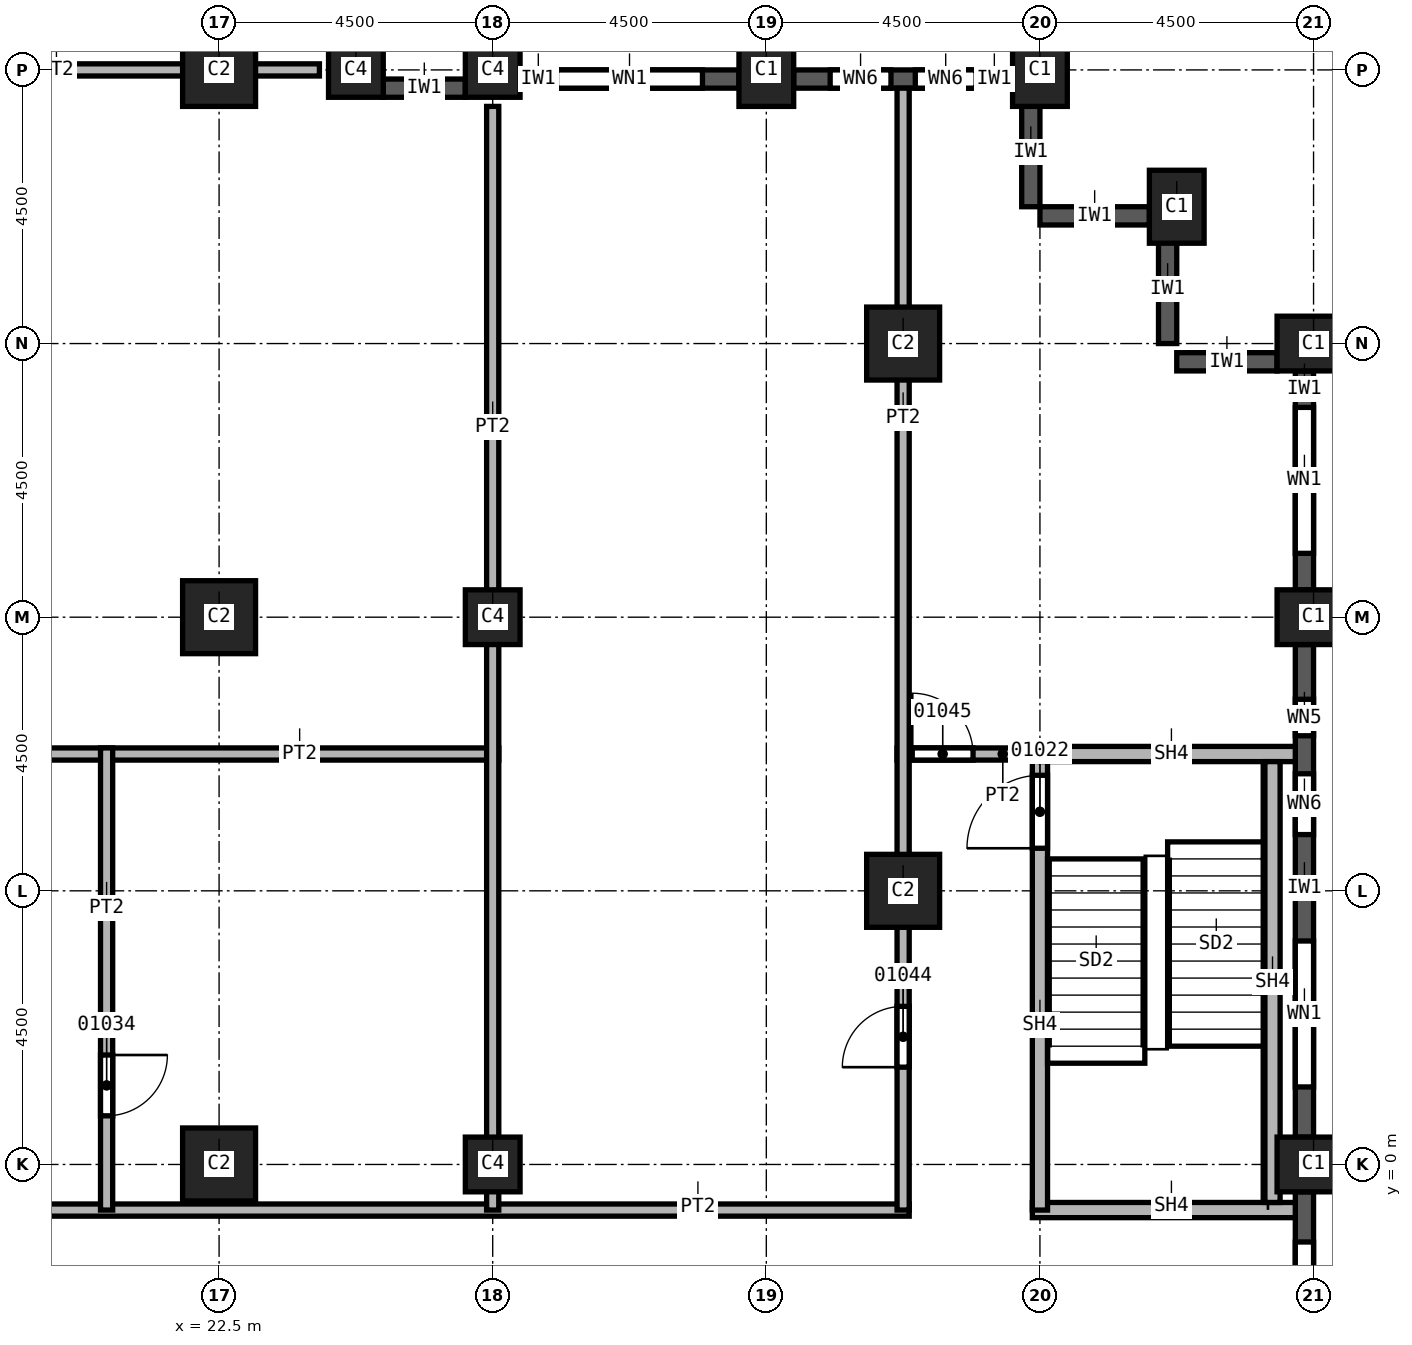
"""IFC4 building model, lengths in metres.
Left out: names, types, materials, properties, quantities, classifications, styles, units other than length and angle.
Written with IfcOpenShell. Run it as: python <this file> out.ifc"""

import sys

from ifc_helpers import new_model, si_unit, direction, frame, frame_2d, origin, origin_2d, place, context, subcontext, project, spatial, rectangle, extrude, element, fill, save


model = new_model("IFC4")
c1 = context("Model", 3, precision=1e-05, world=origin(), true_north=direction((0.0, 1.0)))
c2 = subcontext(c1, "Body", "Model", "MODEL_VIEW")
j1 = project(units=[si_unit("LENGTHUNIT", "METRE"), si_unit("PLANEANGLEUNIT", "RADIAN")], contexts=[c1])
p1 = place(None, origin())
s1 = spatial("IfcSite", under=j1, at=p1, CompositionType="ELEMENT")
p2 = place(p1, origin())
s2 = spatial("IfcBuilding", under=s1, at=p2, CompositionType="ELEMENT")
p3 = place(p2, frame((0.0, 0.0, 68.0)))
s3 = spatial("IfcBuildingStorey", under=s2, at=p3, CompositionType="ELEMENT", Elevation=68.0)
for number, where, z_axis, x_axis in (
    (1, (40.5, 0.0, 0.0), (0.0, 0.0, 1.0), (0.0, 1.0, 0.0)),
    (2, (40.5, 9.0, 0.0), (0.0, 0.0, 1.0), (0.0, 1.0, 0.0)),
    (3, (40.5, 13.5, 0.0), (0.0, 0.0, 1.0), (0.0, 1.0, 0.0)),
    (4, (38.25, 15.75, 0.0), (0.0, 0.0, 1.0), (1.0, 0.0, 0.0)),
    (5, (31.5, 18.0, 0.0), (0.0, 0.0, 1.0), (1.0, 0.0, 0.0)),
    (6, (36.0, 18.0, 0.0), (0.0, 0.0, 1.0), (1.0, 0.0, 0.0)),
):
    element("IfcColumn", number, at=place(p3, frame(where, z_axis=z_axis, x_axis=x_axis)), inside=s3, PredefinedType="COLUMN", context=c2, shape_type="SweptSolid", body=[
        extrude(rectangle(XDim=0.9, YDim=1.2, at=origin_2d()), origin(), (0.0, 0.0, 1.0), 3.7),
    ])
for number, where, z_axis, x_axis in (
    (7, (33.75, 4.5, 0.0), (0.0, 0.0, 1.0), (1.0, 0.0, 0.0)),
    (8, (33.75, 13.5, 0.0), (0.0, 0.0, 1.0), (1.0, 0.0, 0.0)),
    (9, (22.5, 0.0, 0.0), (0.0, 0.0, 1.0), (1.0, 0.0, 0.0)),
    (10, (22.5, 9.0, 0.0), (0.0, 0.0, 1.0), (1.0, 0.0, 0.0)),
    (11, (22.5, 18.0, 0.0), (0.0, 0.0, 1.0), (1.0, 0.0, 0.0)),
):
    element("IfcColumn", number, at=place(p3, frame(where, z_axis=z_axis, x_axis=x_axis)), inside=s3, PredefinedType="COLUMN", context=c2, shape_type="SweptSolid", body=[
        extrude(rectangle(XDim=1.2, YDim=1.2, at=origin_2d()), origin(), (0.0, 0.0, 1.0), 3.7),
    ])
for number, where, z_axis, x_axis in (
    (12, (27.0, 0.0, 0.0), (0.0, 0.0, 1.0), (1.0, 0.0, 0.0)),
    (13, (27.0, 9.0, 0.0), (0.0, 0.0, 1.0), (1.0, 0.0, 0.0)),
    (14, (27.0, 18.0, 0.0), (0.0, 0.0, 1.0), (1.0, 0.0, 0.0)),
    (15, (24.75, 18.0, 0.0), (0.0, 0.0, 1.0), (1.0, 0.0, 0.0)),
):
    element("IfcColumn", number, at=place(p3, frame(where, z_axis=z_axis, x_axis=x_axis)), inside=s3, PredefinedType="COLUMN", context=c2, shape_type="SweptSolid", body=[
        extrude(rectangle(XDim=0.9, YDim=0.9, at=origin_2d()), origin(), (0.0, 0.0, 1.0), 3.7),
    ])
p4 = place(p3, frame((39.9, 13.2, 0.0), z_axis=(0.0, 0.0, 1.0), x_axis=(-1.0, 0.0, 0.0)))
e16 = element("IfcWall", 16, at=p4, inside=s3, PredefinedType="SOLIDWALL", context=c2, shape_type="SweptSolid", body=[
    extrude(rectangle(XDim=1.65, YDim=0.3, at=frame_2d((0.825, 0.0))), origin(), (0.0, 0.0, 1.0), 3.1),
])
for number, where, z_axis, x_axis in (
    (17, (38.1, 15.3, 0.0), (0.0, 0.0, 1.0), (0.0, -1.0, 0.0)),
    (18, (37.8, 15.6, 0.0), (0.0, 0.0, 1.0), (-1.0, 0.0, 0.0)),
    (19, (35.85, 17.55, 0.0), (0.0, 0.0, 1.0), (0.0, -1.0, 0.0)),
):
    element("IfcWall", number, at=place(p3, frame(where, z_axis=z_axis, x_axis=x_axis)), inside=s3, PredefinedType="SOLIDWALL", context=c2, shape_type="SweptSolid", body=[
        extrude(rectangle(XDim=1.8, YDim=0.3, at=frame_2d((0.9, 0.0))), origin(), (0.0, 0.0, 1.0), 3.1),
    ])
p5 = place(p3, frame((40.35, -8.55, 0.0), z_axis=(0.0, 0.0, 1.0), x_axis=(0.0, 1.0, 0.0)))
e20 = element("IfcWall", 20, at=p5, inside=s3, PredefinedType="SOLIDWALL", context=c2, shape_type="SweptSolid", body=[
    extrude(rectangle(XDim=8.1, YDim=0.3, at=frame_2d((4.05, 0.0))), origin(), (0.0, 0.0, 1.0), 3.1),
])
p6 = place(p5, frame((0.825, 0.0, 0.8)))
e21 = element("IfcOpeningElement", 21, at=p6, cuts=e20, PredefinedType="OPENING", context=c2, shape_type="SweptSolid", body=[
    extrude(rectangle(XDim=2.4, YDim=1.95, at=frame_2d((1.2, 0.975))), frame((0.0, 0.15, 0.0), z_axis=(0.0, -1.0, 0.0), x_axis=(1.0, 0.0, 0.0)), (0.0, 0.0, 1.0), 0.3),
])
p7 = place(p5, frame((4.875, 0.0, 0.8)))
e22 = element("IfcOpeningElement", 22, at=p7, cuts=e20, PredefinedType="OPENING", context=c2, shape_type="SweptSolid", body=[
    extrude(rectangle(XDim=2.4, YDim=1.95, at=frame_2d((1.2, 0.975))), frame((0.0, 0.15, 0.0), z_axis=(0.0, -1.0, 0.0), x_axis=(1.0, 0.0, 0.0)), (0.0, 0.0, 1.0), 0.3),
])
p8 = place(p3, frame((40.35, 0.45, 0.0), z_axis=(0.0, 0.0, 1.0), x_axis=(0.0, 1.0, 0.0)))
e23 = element("IfcWall", 23, at=p8, inside=s3, PredefinedType="SOLIDWALL", context=c2, shape_type="SweptSolid", body=[
    extrude(rectangle(XDim=8.1, YDim=0.3, at=frame_2d((4.05, 0.0))), origin(), (0.0, 0.0, 1.0), 3.1),
])
p9 = place(p8, frame((0.825, 0.0, 0.8)))
e24 = element("IfcOpeningElement", 24, at=p9, cuts=e23, PredefinedType="OPENING", context=c2, shape_type="SweptSolid", body=[
    extrude(rectangle(XDim=2.4, YDim=1.95, at=frame_2d((1.2, 0.975))), frame((0.0, 0.15, 0.0), z_axis=(0.0, -1.0, 0.0), x_axis=(1.0, 0.0, 0.0)), (0.0, 0.0, 1.0), 0.3),
])
p10 = place(p8, frame((4.975, 0.0, 0.8)))
e25 = element("IfcOpeningElement", 25, at=p10, cuts=e23, PredefinedType="OPENING", context=c2, shape_type="SweptSolid", body=[
    extrude(rectangle(XDim=1.0, YDim=1.95, at=frame_2d((0.5, 0.975))), frame((0.0, 0.15, 0.0), z_axis=(0.0, -1.0, 0.0), x_axis=(1.0, 0.0, 0.0)), (0.0, 0.0, 1.0), 0.3),
])
p11 = place(p8, frame((6.6, 0.0, 0.8)))
e26 = element("IfcOpeningElement", 26, at=p11, cuts=e23, PredefinedType="OPENING", context=c2, shape_type="SweptSolid", body=[
    extrude(rectangle(XDim=0.6, YDim=1.95, at=frame_2d((0.3, 0.975))), frame((0.0, 0.15, 0.0), z_axis=(0.0, -1.0, 0.0), x_axis=(1.0, 0.0, 0.0)), (0.0, 0.0, 1.0), 0.3),
])
p12 = place(p3, frame((40.35, 9.45, 0.0), z_axis=(0.0, 0.0, 1.0), x_axis=(0.0, 1.0, 0.0)))
e27 = element("IfcWall", 27, at=p12, inside=s3, PredefinedType="SOLIDWALL", context=c2, shape_type="SweptSolid", body=[
    extrude(rectangle(XDim=3.6, YDim=0.3, at=frame_2d((1.8, 0.0))), origin(), (0.0, 0.0, 1.0), 3.1),
])
p13 = place(p12, frame((0.6, 0.0, 0.8)))
e28 = element("IfcOpeningElement", 28, at=p13, cuts=e27, PredefinedType="OPENING", context=c2, shape_type="SweptSolid", body=[
    extrude(rectangle(XDim=2.4, YDim=1.95, at=frame_2d((1.2, 0.975))), frame((0.0, 0.15, 0.0), z_axis=(0.0, -1.0, 0.0), x_axis=(1.0, 0.0, 0.0)), (0.0, 0.0, 1.0), 0.3),
])
p14 = place(p3, frame((35.55, 17.85, 0.0), z_axis=(0.0, 0.0, 1.0), x_axis=(-1.0, 0.0, 0.0)))
e29 = element("IfcWall", 29, at=p14, inside=s3, PredefinedType="SOLIDWALL", context=c2, shape_type="SweptSolid", body=[
    extrude(rectangle(XDim=3.6, YDim=0.3, at=frame_2d((1.8, 0.0))), origin(), (0.0, 0.0, 1.0), 3.1),
])
p15 = place(p14, frame((0.6, 0.0, 0.8)))
e30 = element("IfcOpeningElement", 30, at=p15, cuts=e29, PredefinedType="OPENING", context=c2, shape_type="SweptSolid", body=[
    extrude(rectangle(XDim=1.0, YDim=1.95, at=frame_2d((0.5, 0.975))), frame((0.0, 0.15, 0.0), z_axis=(0.0, -1.0, 0.0), x_axis=(1.0, 0.0, 0.0)), (0.0, 0.0, 1.0), 0.3),
])
p16 = place(p14, frame((2.0, 0.0, 0.8)))
e31 = element("IfcOpeningElement", 31, at=p16, cuts=e29, PredefinedType="OPENING", context=c2, shape_type="SweptSolid", body=[
    extrude(rectangle(XDim=1.0, YDim=1.95, at=frame_2d((0.5, 0.975))), frame((0.0, 0.15, 0.0), z_axis=(0.0, -1.0, 0.0), x_axis=(1.0, 0.0, 0.0)), (0.0, 0.0, 1.0), 0.3),
])
p17 = place(p3, frame((31.05, 17.85, 0.0), z_axis=(0.0, 0.0, 1.0), x_axis=(-1.0, 0.0, 0.0)))
e32 = element("IfcWall", 32, at=p17, inside=s3, PredefinedType="SOLIDWALL", context=c2, shape_type="SweptSolid", body=[
    extrude(rectangle(XDim=3.6, YDim=0.3, at=frame_2d((1.8, 0.0))), origin(), (0.0, 0.0, 1.0), 3.1),
])
p18 = place(p17, frame((0.6, 0.0, 0.8)))
e33 = element("IfcOpeningElement", 33, at=p18, cuts=e32, PredefinedType="OPENING", context=c2, shape_type="SweptSolid", body=[
    extrude(rectangle(XDim=2.4, YDim=1.95, at=frame_2d((1.2, 0.975))), frame((0.0, 0.15, 0.0), z_axis=(0.0, -1.0, 0.0), x_axis=(1.0, 0.0, 0.0)), (0.0, 0.0, 1.0), 0.3),
])
p19 = place(p3, frame((26.55, 17.7, 0.0), z_axis=(0.0, 0.0, 1.0), x_axis=(-1.0, 0.0, 0.0)))
e34 = element("IfcWall", 34, at=p19, inside=s3, PredefinedType="SOLIDWALL", context=c2, shape_type="SweptSolid", body=[
    extrude(rectangle(XDim=1.35, YDim=0.3, at=frame_2d((0.675, 0.0))), origin(), (0.0, 0.0, 1.0), 3.1),
])
p20 = place(p3, frame((15.4, -0.75, 0.0), z_axis=(0.0, 0.0, 1.0), x_axis=(1.0, 0.0, 0.0)))
e35 = element("IfcWall", 35, at=p20, inside=s3, PredefinedType="PARTITIONING", context=c2, shape_type="SweptSolid", body=[
    extrude(rectangle(XDim=18.45, YDim=0.2, at=frame_2d((9.225, 0.0))), origin(), (0.0, 0.0, 1.0), 3.7),
])
p21 = place(p3, frame((15.4, 6.75, 0.0), z_axis=(0.0, 0.0, 1.0), x_axis=(1.0, 0.0, 0.0)))
e36 = element("IfcWall", 36, at=p21, inside=s3, PredefinedType="PARTITIONING", context=c2, shape_type="SweptSolid", body=[
    extrude(rectangle(XDim=11.7, YDim=0.2, at=frame_2d((5.85, 0.0))), origin(), (0.0, 0.0, 1.0), 3.7),
])
p22 = place(p3, frame((15.4, 18.0, 0.0), z_axis=(0.0, 0.0, 1.0), x_axis=(1.0, 0.0, 0.0)))
e37 = element("IfcWall", 37, at=p22, inside=s3, PredefinedType="PARTITIONING", context=c2, shape_type="SweptSolid", body=[
    extrude(rectangle(XDim=8.75, YDim=0.2, at=frame_2d((4.375, 0.0))), origin(), (0.0, 0.0, 1.0), 3.7),
])
p23 = place(p3, frame((20.65, 6.85, 0.0), z_axis=(0.0, 0.0, 1.0), x_axis=(0.0, -1.0, 0.0)))
e38 = element("IfcWall", 38, at=p23, inside=s3, PredefinedType="PARTITIONING", context=c2, shape_type="SweptSolid", body=[
    extrude(rectangle(XDim=7.6, YDim=0.2, at=frame_2d((3.8, 0.0))), origin(), (0.0, 0.0, 1.0), 3.7),
])
p24 = place(p23, frame((5.05, 0.0, 0.0)))
e39 = element("IfcOpeningElement", 39, at=p24, cuts=e38, PredefinedType="OPENING", context=c2, shape_type="SweptSolid", body=[
    extrude(rectangle(XDim=1.0, YDim=2.1, at=frame_2d((0.5, 1.05))), frame((0.0, 0.1, 0.0), z_axis=(0.0, -1.0, 0.0), x_axis=(1.0, 0.0, 0.0)), (0.0, 0.0, 1.0), 0.2),
])
p25 = place(p3, frame((27.0, 17.4, 0.0), z_axis=(0.0, 0.0, 1.0), x_axis=(0.0, -1.0, 0.0)))
e40 = element("IfcWall", 40, at=p25, inside=s3, PredefinedType="PARTITIONING", context=c2, shape_type="SweptSolid", body=[
    extrude(rectangle(XDim=18.15, YDim=0.2, at=frame_2d((9.075, 0.0))), origin(), (0.0, 0.0, 1.0), 3.7),
])
p26 = place(p3, frame((33.65, 6.75, 0.0), z_axis=(0.0, 0.0, 1.0), x_axis=(1.0, 0.0, 0.0)))
e41 = element("IfcWall", 41, at=p26, inside=s3, PredefinedType="PARTITIONING", context=c2, shape_type="SweptSolid", body=[
    extrude(rectangle(XDim=2.35, YDim=0.2, at=frame_2d((1.175, 0.0))), origin(), (0.0, 0.0, 1.0), 3.7),
])
p27 = place(p26, frame((0.25, 0.0, 0.0)))
e42 = element("IfcOpeningElement", 42, at=p27, cuts=e41, PredefinedType="OPENING", context=c2, shape_type="SweptSolid", body=[
    extrude(rectangle(XDim=1.0, YDim=2.1, at=frame_2d((0.5, 1.05))), frame((0.0, 0.1, 0.0), z_axis=(0.0, -1.0, 0.0), x_axis=(1.0, 0.0, 0.0)), (0.0, 0.0, 1.0), 0.2),
])
p28 = place(p3, frame((33.75, -0.75, 0.0), z_axis=(0.0, 0.0, 1.0), x_axis=(0.0, 1.0, 0.0)))
e43 = element("IfcWall", 43, at=p28, inside=s3, PredefinedType="PARTITIONING", context=c2, shape_type="SweptSolid", body=[
    extrude(rectangle(XDim=18.45, YDim=0.2, at=frame_2d((9.225, 0.0))), origin(), (0.0, 0.0, 1.0), 3.7),
])
p29 = place(p28, frame((2.35, 0.0, 0.0)))
e44 = element("IfcOpeningElement", 44, at=p29, cuts=e43, PredefinedType="OPENING", context=c2, shape_type="SweptSolid", body=[
    extrude(rectangle(XDim=1.0, YDim=2.1, at=frame_2d((0.5, 1.05))), frame((0.0, 0.1, 0.0), z_axis=(0.0, -1.0, 0.0), x_axis=(1.0, 0.0, 0.0)), (0.0, 0.0, 1.0), 0.2),
])
p30 = place(p3, frame((35.875, -0.75, 0.0), z_axis=(0.0, 0.0, 1.0), x_axis=(1.0, 0.0, 0.0)))
e45 = element("IfcWall", 45, at=p30, inside=s3, PredefinedType="SOLIDWALL", context=c2, shape_type="SweptSolid", body=[
    extrude(rectangle(XDim=4.325, YDim=0.25, at=frame_2d((2.163, 0.0))), origin(), (0.0, 0.0, 1.0), 3.7),
])
p31 = place(p3, frame((36.0, -0.75, 0.0), z_axis=(0.0, 0.0, 1.0), x_axis=(0.0, 1.0, 0.0)))
e46 = element("IfcWall", 46, at=p31, inside=s3, PredefinedType="SOLIDWALL", context=c2, shape_type="SweptSolid", body=[
    extrude(rectangle(XDim=7.625, YDim=0.25, at=frame_2d((3.812, 0.0))), origin(), (0.0, 0.0, 1.0), 3.7),
])
p32 = place(p31, frame((5.95, 0.0, 0.0)))
e47 = element("IfcOpeningElement", 47, at=p32, cuts=e46, PredefinedType="OPENING", context=c2, shape_type="SweptSolid", body=[
    extrude(rectangle(XDim=1.2, YDim=2.1, at=frame_2d((0.6, 1.05))), frame((0.0, 0.125, 0.0), z_axis=(0.0, -1.0, 0.0), x_axis=(1.0, 0.0, 0.0)), (0.0, 0.0, 1.0), 0.25),
])
p33 = place(p3, frame((36.0, 6.75, 0.0), z_axis=(0.0, 0.0, 1.0), x_axis=(1.0, 0.0, 0.0)))
e48 = element("IfcWall", 48, at=p33, inside=s3, PredefinedType="SOLIDWALL", context=c2, shape_type="SweptSolid", body=[
    extrude(rectangle(XDim=4.2, YDim=0.25, at=frame_2d((2.1, 0.0))), origin(), (0.0, 0.0, 1.0), 3.7),
])
p34 = place(p3, frame((39.825, -0.625, 0.0), z_axis=(0.0, 0.0, 1.0), x_axis=(0.0, 1.0, 0.0)))
e49 = element("IfcWall", 49, at=p34, inside=s3, PredefinedType="SOLIDWALL", context=c2, shape_type="SweptSolid", body=[
    extrude(rectangle(XDim=7.25, YDim=0.25, at=frame_2d((3.625, 0.0))), origin(), (0.0, 0.0, 1.0), 3.7),
])
p35 = place(p7, origin())
e50 = element("IfcWindow", 50, at=p35, inside=s3, PartitioningType="SINGLE_PANEL", PredefinedType="WINDOW", context=c2, shape_type="SweptSolid", body=[
    extrude(rectangle(XDim=2.4, YDim=1.95, at=frame_2d((1.2, 0.975))), frame((0.0, 0.03, 0.0), z_axis=(0.0, -1.0, 0.0), x_axis=(1.0, 0.0, 0.0)), (0.0, 0.0, 1.0), 0.06),
])
fill(e22, e50)
p36 = place(p9, origin())
e51 = element("IfcWindow", 51, at=p36, inside=s3, PartitioningType="SINGLE_PANEL", PredefinedType="WINDOW", context=c2, shape_type="SweptSolid", body=[
    extrude(rectangle(XDim=2.4, YDim=1.95, at=frame_2d((1.2, 0.975))), frame((0.0, 0.03, 0.0), z_axis=(0.0, -1.0, 0.0), x_axis=(1.0, 0.0, 0.0)), (0.0, 0.0, 1.0), 0.06),
])
fill(e24, e51)
p37 = place(p13, origin())
e52 = element("IfcWindow", 52, at=p37, inside=s3, PartitioningType="SINGLE_PANEL", PredefinedType="WINDOW", context=c2, shape_type="SweptSolid", body=[
    extrude(rectangle(XDim=2.4, YDim=1.95, at=frame_2d((1.2, 0.975))), frame((0.0, 0.03, 0.0), z_axis=(0.0, -1.0, 0.0), x_axis=(1.0, 0.0, 0.0)), (0.0, 0.0, 1.0), 0.06),
])
fill(e28, e52)
p38 = place(p18, origin())
e53 = element("IfcWindow", 53, at=p38, inside=s3, PartitioningType="SINGLE_PANEL", PredefinedType="WINDOW", context=c2, shape_type="SweptSolid", body=[
    extrude(rectangle(XDim=2.4, YDim=1.95, at=frame_2d((1.2, 0.975))), frame((0.0, 0.03, 0.0), z_axis=(0.0, -1.0, 0.0), x_axis=(1.0, 0.0, 0.0)), (0.0, 0.0, 1.0), 0.06),
])
fill(e33, e53)
p39 = place(p32, origin())
e54 = element("IfcDoor", 54, at=p39, inside=s3, OperationType="SINGLE_SWING_LEFT", PredefinedType="DOOR", context=c2, shape_type="SweptSolid", body=[
    extrude(rectangle(XDim=1.2, YDim=2.1, at=frame_2d((0.6, 1.05))), frame((0.0, 0.025, 0.0), z_axis=(0.0, -1.0, 0.0), x_axis=(1.0, 0.0, 0.0)), (0.0, 0.0, 1.0), 0.05),
])
fill(e47, e54)
p40 = place(p24, origin())
e55 = element("IfcDoor", 55, at=p40, inside=s3, OperationType="SINGLE_SWING_LEFT", PredefinedType="DOOR", context=c2, shape_type="SweptSolid", body=[
    extrude(rectangle(XDim=1.0, YDim=2.1, at=frame_2d((0.5, 1.05))), frame((0.0, 0.025, 0.0), z_axis=(0.0, -1.0, 0.0), x_axis=(1.0, 0.0, 0.0)), (0.0, 0.0, 1.0), 0.05),
])
fill(e39, e55)
p41 = place(p29, origin())
e56 = element("IfcDoor", 56, at=p41, inside=s3, OperationType="SINGLE_SWING_LEFT", PredefinedType="DOOR", context=c2, shape_type="SweptSolid", body=[
    extrude(rectangle(XDim=1.0, YDim=2.1, at=frame_2d((0.5, 1.05))), frame((0.0, 0.025, 0.0), z_axis=(0.0, -1.0, 0.0), x_axis=(1.0, 0.0, 0.0)), (0.0, 0.0, 1.0), 0.05),
])
fill(e44, e56)
p42 = place(p27, origin())
e57 = element("IfcDoor", 57, at=p42, inside=s3, OperationType="SINGLE_SWING_RIGHT", PredefinedType="DOOR", context=c2, shape_type="SweptSolid", body=[
    extrude(rectangle(XDim=1.0, YDim=2.1, at=frame_2d((0.5, 1.05))), frame((0.0, 0.025, 0.0), z_axis=(0.0, -1.0, 0.0), x_axis=(1.0, 0.0, 0.0)), (0.0, 0.0, 1.0), 0.05),
])
fill(e42, e57)
p43 = place(p10, origin())
e58 = element("IfcWindow", 58, at=p43, inside=s3, PartitioningType="SINGLE_PANEL", PredefinedType="WINDOW", context=c2, shape_type="SweptSolid", body=[
    extrude(rectangle(XDim=1.0, YDim=1.95, at=frame_2d((0.5, 0.975))), frame((0.0, 0.03, 0.0), z_axis=(0.0, -1.0, 0.0), x_axis=(1.0, 0.0, 0.0)), (0.0, 0.0, 1.0), 0.06),
])
fill(e25, e58)
p44 = place(p11, origin())
e59 = element("IfcWindow", 59, at=p44, inside=s3, PartitioningType="SINGLE_PANEL", PredefinedType="WINDOW", context=c2, shape_type="SweptSolid", body=[
    extrude(rectangle(XDim=0.6, YDim=1.95, at=frame_2d((0.3, 0.975))), frame((0.0, 0.03, 0.0), z_axis=(0.0, -1.0, 0.0), x_axis=(1.0, 0.0, 0.0)), (0.0, 0.0, 1.0), 0.06),
])
fill(e26, e59)
p45 = place(p15, origin())
e60 = element("IfcWindow", 60, at=p45, inside=s3, PartitioningType="SINGLE_PANEL", PredefinedType="WINDOW", context=c2, shape_type="SweptSolid", body=[
    extrude(rectangle(XDim=1.0, YDim=1.95, at=frame_2d((0.5, 0.975))), frame((0.0, 0.03, 0.0), z_axis=(0.0, -1.0, 0.0), x_axis=(1.0, 0.0, 0.0)), (0.0, 0.0, 1.0), 0.06),
])
fill(e30, e60)
p46 = place(p16, origin())
e61 = element("IfcWindow", 61, at=p46, inside=s3, PartitioningType="SINGLE_PANEL", PredefinedType="WINDOW", context=c2, shape_type="SweptSolid", body=[
    extrude(rectangle(XDim=1.0, YDim=1.95, at=frame_2d((0.5, 0.975))), frame((0.0, 0.03, 0.0), z_axis=(0.0, -1.0, 0.0), x_axis=(1.0, 0.0, 0.0)), (0.0, 0.0, 1.0), 0.06),
])
fill(e31, e61)
save(model, sys.argv[1])
